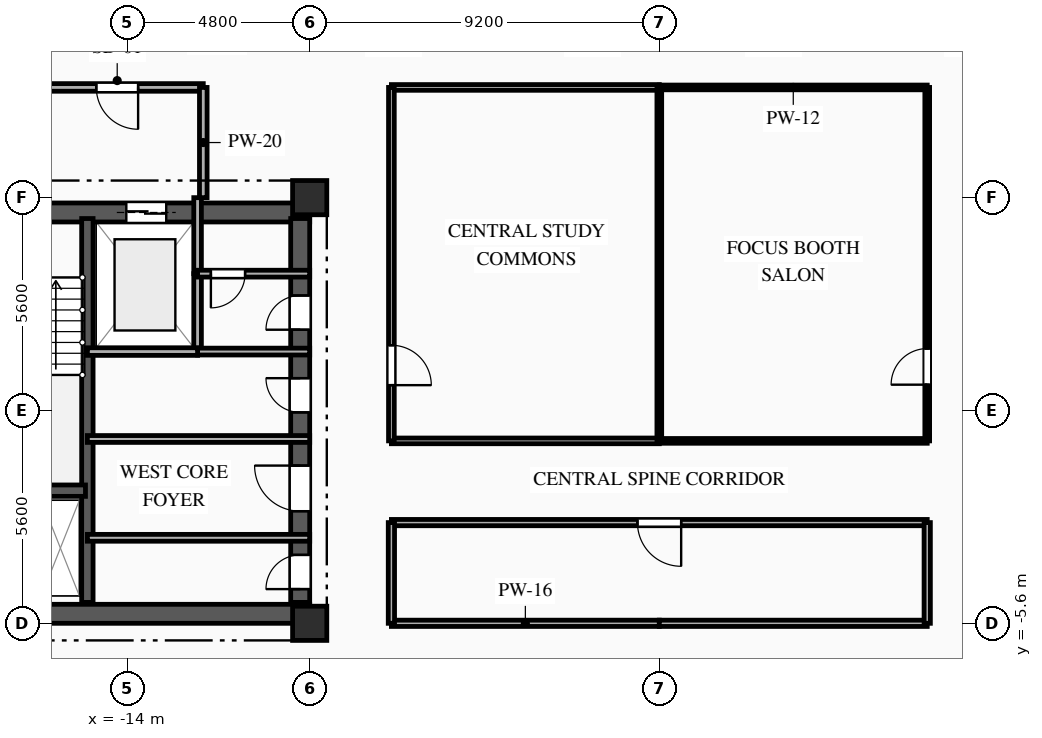
"""IFC4 building model, lengths in metres.
Left out: names, types, materials, properties, quantities, classifications, styles, units other than length and angle.
Written with IfcOpenShell. Run it as: python <this file> out.ifc"""

import sys

from ifc_helpers import new_model, si_unit, direction, frame, frame_2d, origin, origin_2d, place, context, subcontext, project, spatial, rectangle, extrude, element, fill, save


model = new_model("IFC4")
c1 = context("Model", 3, precision=1e-05, world=origin(), true_north=direction((0.0, 1.0)))
c2 = subcontext(c1, "Body", "Model", "MODEL_VIEW")
j1 = project(units=[si_unit("LENGTHUNIT", "METRE"), si_unit("PLANEANGLEUNIT", "RADIAN")], contexts=[c1])
p1 = place(None, origin())
s1 = spatial("IfcSite", under=j1, at=p1, CompositionType="ELEMENT")
p2 = place(p1, origin())
s2 = spatial("IfcBuilding", under=s1, at=p2, CompositionType="ELEMENT")
p3 = place(p2, frame((0.0, 0.0, 144.4)))
s3 = spatial("IfcBuildingStorey", under=s2, at=p3, CompositionType="ELEMENT", Elevation=144.4)
for number, where, z_axis, x_axis in (
    (1, (-9.2, -5.6, 0.0), (0.0, 0.0, 1.0), (1.0, 0.0, 0.0)),
    (2, (-9.2, 5.6, 0.0), (0.0, 0.0, 1.0), (1.0, 0.0, 0.0)),
):
    element("IfcColumn", number, at=place(p3, frame(where, z_axis=z_axis, x_axis=x_axis)), inside=s3, PredefinedType="COLUMN", context=c2, shape_type="SweptSolid", body=[
        extrude(rectangle(XDim=0.9, YDim=0.9, at=origin_2d()), origin(), (0.0, 0.0, 1.0), 3.35),
    ])
p4 = place(p3, frame((-18.8, 5.21, 0.0), z_axis=(0.0, 0.0, 1.0), x_axis=(1.0, 0.0, 0.0)))
e3 = element("IfcWall", 3, at=p4, inside=s3, PredefinedType="SHEAR", context=c2, shape_type="SweptSolid", body=[
    extrude(rectangle(XDim=9.6, YDim=0.5, at=frame_2d((4.8, 0.0))), origin(), (0.0, 0.0, 1.0), 3.04),
])
p5 = place(p4, frame((1.55, 0.0, 0.0)))
e4 = element("IfcOpeningElement", 4, at=p5, cuts=e3, PredefinedType="OPENING", context=c2, shape_type="SweptSolid", body=[
    extrude(rectangle(XDim=1.1, YDim=2.15, at=frame_2d((0.55, 1.075))), frame((0.0, 0.26, 0.0), z_axis=(0.0, -1.0, 0.0), x_axis=(1.0, 0.0, 0.0)), (0.0, 0.0, 1.0), 0.52),
])
p6 = place(p4, frame((4.775, 0.0, 0.0)))
e5 = element("IfcOpeningElement", 5, at=p6, cuts=e3, PredefinedType="OPENING", context=c2, shape_type="SweptSolid", body=[
    extrude(rectangle(XDim=1.05, YDim=2.1, at=frame_2d((0.525, 1.05))), frame((0.0, 0.26, 0.0), z_axis=(0.0, -1.0, 0.0), x_axis=(1.0, 0.0, 0.0)), (0.0, 0.0, 1.0), 0.52),
])
p7 = place(p3, frame((-18.8, -5.35, 0.0), z_axis=(0.0, 0.0, 1.0), x_axis=(1.0, 0.0, 0.0)))
e6 = element("IfcWall", 6, at=p7, inside=s3, PredefinedType="SHEAR", context=c2, shape_type="SweptSolid", body=[
    extrude(rectangle(XDim=9.6, YDim=0.5, at=frame_2d((4.8, 0.0))), origin(), (0.0, 0.0, 1.0), 3.04),
])
p8 = place(p7, frame((1.05, 0.0, 0.0)))
e7 = element("IfcOpeningElement", 7, at=p8, cuts=e6, PredefinedType="OPENING", context=c2, shape_type="SweptSolid", body=[
    extrude(rectangle(XDim=0.9, YDim=2.1, at=frame_2d((0.45, 1.05))), frame((0.0, 0.26, 0.0), z_axis=(0.0, -1.0, 0.0), x_axis=(1.0, 0.0, 0.0)), (0.0, 0.0, 1.0), 0.52),
])
p9 = place(p3, frame((-9.45, -5.05, 0.0), z_axis=(0.0, 0.0, 1.0), x_axis=(0.0, 1.0, 0.0)))
e8 = element("IfcWall", 8, at=p9, inside=s3, PredefinedType="SHEAR", context=c2, shape_type="SweptSolid", body=[
    extrude(rectangle(XDim=10.1, YDim=0.5, at=frame_2d((5.05, 0.0))), origin(), (0.0, 0.0, 1.0), 3.04),
])
p10 = place(p9, frame((7.175, 0.0, 0.0)))
e9 = element("IfcOpeningElement", 9, at=p10, cuts=e8, PredefinedType="OPENING", context=c2, shape_type="SweptSolid", body=[
    extrude(rectangle(XDim=0.9, YDim=2.1, at=frame_2d((0.45, 1.05))), frame((0.0, 0.26, 0.0), z_axis=(0.0, -1.0, 0.0), x_axis=(1.0, 0.0, 0.0)), (0.0, 0.0, 1.0), 0.52),
])
p11 = place(p9, frame((2.4, 0.0, 0.0)))
e10 = element("IfcOpeningElement", 10, at=p11, cuts=e8, PredefinedType="OPENING", context=c2, shape_type="SweptSolid", body=[
    extrude(rectangle(XDim=1.2, YDim=2.15, at=frame_2d((0.6, 1.075))), frame((0.0, 0.26, 0.0), z_axis=(0.0, -1.0, 0.0), x_axis=(1.0, 0.0, 0.0)), (0.0, 0.0, 1.0), 0.52),
])
p12 = place(p9, frame((0.35, 0.0, 0.0)))
e11 = element("IfcOpeningElement", 11, at=p12, cuts=e8, PredefinedType="OPENING", context=c2, shape_type="SweptSolid", body=[
    extrude(rectangle(XDim=0.9, YDim=2.1, at=frame_2d((0.45, 1.05))), frame((0.0, 0.26, 0.0), z_axis=(0.0, -1.0, 0.0), x_axis=(1.0, 0.0, 0.0)), (0.0, 0.0, 1.0), 0.52),
])
p13 = place(p9, frame((5.0, 0.0, 0.0)))
e12 = element("IfcOpeningElement", 12, at=p13, cuts=e8, PredefinedType="OPENING", context=c2, shape_type="SweptSolid", body=[
    extrude(rectangle(XDim=0.9, YDim=2.1, at=frame_2d((0.45, 1.05))), frame((0.0, 0.26, 0.0), z_axis=(0.0, -1.0, 0.0), x_axis=(1.0, 0.0, 0.0)), (0.0, 0.0, 1.0), 0.52),
])
p14 = place(p3, frame((-15.05, -5.05, 0.0), z_axis=(0.0, 0.0, 1.0), x_axis=(0.0, 1.0, 0.0)))
e13 = element("IfcWall", 13, at=p14, inside=s3, PredefinedType="SHEAR", context=c2, shape_type="SweptSolid", body=[
    extrude(rectangle(XDim=10.1, YDim=0.3, at=frame_2d((5.05, 0.0))), origin(), (0.0, 0.0, 1.0), 3.04),
])
p15 = place(p3, frame((-18.28, -2.11, 0.0), z_axis=(0.0, 0.0, 1.0), x_axis=(1.0, 0.0, 0.0)))
e14 = element("IfcWall", 14, at=p15, inside=s3, PredefinedType="SHEAR", context=c2, shape_type="SweptSolid", body=[
    extrude(rectangle(XDim=3.18, YDim=0.3, at=frame_2d((1.59, 0.0))), origin(), (0.0, 0.0, 1.0), 3.04),
])
p16 = place(p3, frame((-12.15, 1.55, 0.0), z_axis=(0.0, 0.0, 1.0), x_axis=(0.0, 1.0, 0.0)))
e15 = element("IfcWall", 15, at=p16, inside=s3, PredefinedType="PARTITIONING", context=c2, shape_type="SweptSolid", body=[
    extrude(rectangle(XDim=2.05, YDim=0.2, at=frame_2d((1.025, 0.0))), origin(), (0.0, 0.0, 1.0), 3.04),
])
p17 = place(p3, frame((-12.15, 3.6, 0.0), z_axis=(0.0, 0.0, 1.0), x_axis=(0.0, 1.0, 0.0)))
e16 = element("IfcWall", 16, at=p17, inside=s3, PredefinedType="PARTITIONING", context=c2, shape_type="SweptSolid", body=[
    extrude(rectangle(XDim=2.0, YDim=0.2, at=frame_2d((1.0, 0.0))), origin(), (0.0, 0.0, 1.0), 3.04),
])
p18 = place(p3, frame((-12.0, 8.5, 0.0), z_axis=(0.0, 0.0, 1.0), x_axis=(-1.0, 0.0, 0.0)))
e17 = element("IfcWall", 17, at=p18, inside=s3, PredefinedType="PARTITIONING", context=c2, shape_type="SweptSolid", body=[
    extrude(rectangle(XDim=6.8, YDim=0.2, at=frame_2d((3.4, 0.0))), origin(), (0.0, 0.0, 1.0), 3.04),
])
p19 = place(p18, frame((1.715, 0.0, 0.0)))
e18 = element("IfcOpeningElement", 18, at=p19, cuts=e17, PredefinedType="OPENING", context=c2, shape_type="SweptSolid", body=[
    extrude(rectangle(XDim=1.1, YDim=2.15, at=frame_2d((0.55, 1.075))), frame((0.0, 0.11, 0.0), z_axis=(0.0, -1.0, 0.0), x_axis=(1.0, 0.0, 0.0)), (0.0, 0.0, 1.0), 0.22),
])
p20 = place(p3, frame((-12.0, 5.6, 0.0), z_axis=(0.0, 0.0, 1.0), x_axis=(0.0, 1.0, 0.0)))
e19 = element("IfcWall", 19, at=p20, inside=s3, PredefinedType="PARTITIONING", context=c2, shape_type="SweptSolid", body=[
    extrude(rectangle(XDim=2.9, YDim=0.2, at=frame_2d((1.45, 0.0))), origin(), (0.0, 0.0, 1.0), 3.04),
])
p21 = place(p3, frame((-9.2, 3.6, 0.0), z_axis=(0.0, 0.0, 1.0), x_axis=(-1.0, 0.0, 0.0)))
e20 = element("IfcWall", 20, at=p21, inside=s3, PredefinedType="PARTITIONING", context=c2, shape_type="SweptSolid", body=[
    extrude(rectangle(XDim=2.95, YDim=0.18, at=frame_2d((1.475, 0.0))), origin(), (0.0, 0.0, 1.0), 3.04),
])
p22 = place(p21, frame((1.7, 0.0, 0.0)))
e21 = element("IfcOpeningElement", 21, at=p22, cuts=e20, PredefinedType="OPENING", context=c2, shape_type="SweptSolid", body=[
    extrude(rectangle(XDim=0.9, YDim=2.1, at=frame_2d((0.45, 1.05))), frame((0.0, 0.1, 0.0), z_axis=(0.0, -1.0, 0.0), x_axis=(1.0, 0.0, 0.0)), (0.0, 0.0, 1.0), 0.2),
])
p23 = place(p3, frame((-12.15, 1.55, 0.0), z_axis=(0.0, 0.0, 1.0), x_axis=(1.0, 0.0, 0.0)))
e22 = element("IfcWall", 22, at=p23, inside=s3, PredefinedType="PARTITIONING", context=c2, shape_type="SweptSolid", body=[
    extrude(rectangle(XDim=2.95, YDim=0.18, at=frame_2d((1.475, 0.0))), origin(), (0.0, 0.0, 1.0), 3.04),
])
p24 = place(p3, frame((-15.05, -3.35, 0.0), z_axis=(0.0, 0.0, 1.0), x_axis=(1.0, 0.0, 0.0)))
e23 = element("IfcWall", 23, at=p24, inside=s3, PredefinedType="PARTITIONING", context=c2, shape_type="SweptSolid", body=[
    extrude(rectangle(XDim=5.85, YDim=0.18, at=frame_2d((2.925, 0.0))), origin(), (0.0, 0.0, 1.0), 2.755),
])
p25 = place(p3, frame((-9.2, -0.75, 0.0), z_axis=(0.0, 0.0, 1.0), x_axis=(-1.0, 0.0, 0.0)))
e24 = element("IfcWall", 24, at=p25, inside=s3, PredefinedType="PARTITIONING", context=c2, shape_type="SweptSolid", body=[
    extrude(rectangle(XDim=5.85, YDim=0.18, at=frame_2d((2.925, 0.0))), origin(), (0.0, 0.0, 1.0), 3.04),
])
p26 = place(p3, frame((0.0, 8.5, 0.0), z_axis=(0.0, 0.0, 1.0), x_axis=(-1.0, 0.0, 0.0)))
e25 = element("IfcWall", 25, at=p26, inside=s3, PredefinedType="PARTITIONING", context=c2, shape_type="SweptSolid", body=[
    extrude(rectangle(XDim=7.05, YDim=0.15, at=frame_2d((3.525, 0.0))), origin(), (0.0, 0.0, 1.0), 3.04),
])
p27 = place(p3, frame((7.05, 8.5, 0.0), z_axis=(0.0, 0.0, 1.0), x_axis=(-1.0, 0.0, 0.0)))
e26 = element("IfcWall", 26, at=p27, inside=s3, PredefinedType="PARTITIONING", context=c2, shape_type="SweptSolid", body=[
    extrude(rectangle(XDim=7.05, YDim=0.125, at=frame_2d((3.525, 0.0))), origin(), (0.0, 0.0, 1.0), 3.04),
])
for number, where, z_axis, x_axis in (
    (27, (-7.05, -5.6, 0.0), (0.0, 0.0, 1.0), (1.0, 0.0, 0.0)),
    (28, (0.0, -5.6, 0.0), (0.0, 0.0, 1.0), (1.0, 0.0, 0.0)),
):
    element("IfcWall", number, at=place(p3, frame(where, z_axis=z_axis, x_axis=x_axis)), inside=s3, PredefinedType="PARTITIONING", context=c2, shape_type="SweptSolid", body=[
        extrude(rectangle(XDim=7.05, YDim=0.165, at=frame_2d((3.525, 0.0))), origin(), (0.0, 0.0, 1.0), 2.525),
    ])
p28 = place(p3, frame((-7.05, -0.8, 0.0), z_axis=(0.0, 0.0, 1.0), x_axis=(1.0, 0.0, 0.0)))
e29 = element("IfcWall", 29, at=p28, inside=s3, PredefinedType="PARTITIONING", context=c2, shape_type="SweptSolid", body=[
    extrude(rectangle(XDim=7.05, YDim=0.15, at=frame_2d((3.525, 0.0))), origin(), (0.0, 0.0, 1.0), 3.04),
])
p29 = place(p3, frame((0.0, -0.8, 0.0), z_axis=(0.0, 0.0, 1.0), x_axis=(1.0, 0.0, 0.0)))
e30 = element("IfcWall", 30, at=p29, inside=s3, PredefinedType="PARTITIONING", context=c2, shape_type="SweptSolid", body=[
    extrude(rectangle(XDim=7.05, YDim=0.125, at=frame_2d((3.525, 0.0))), origin(), (0.0, 0.0, 1.0), 3.04),
])
p30 = place(p3, frame((7.05, -2.95, 0.0), z_axis=(0.0, 0.0, 1.0), x_axis=(-1.0, 0.0, 0.0)))
e31 = element("IfcWall", 31, at=p30, inside=s3, PredefinedType="PARTITIONING", context=c2, shape_type="SweptSolid", body=[
    extrude(rectangle(XDim=14.1, YDim=0.165, at=frame_2d((7.05, 0.0))), origin(), (0.0, 0.0, 1.0), 3.04),
])
p31 = place(p30, frame((6.475, 0.0, 0.0)))
e32 = element("IfcOpeningElement", 32, at=p31, cuts=e31, PredefinedType="OPENING", context=c2, shape_type="SweptSolid", body=[
    extrude(rectangle(XDim=1.15, YDim=2.15, at=frame_2d((0.575, 1.075))), frame((0.0, 0.093, 0.0), z_axis=(0.0, -1.0, 0.0), x_axis=(1.0, 0.0, 0.0)), (0.0, 0.0, 1.0), 0.185),
])
p32 = place(p3, frame((-7.05, 8.5, 0.0), z_axis=(0.0, 0.0, 1.0), x_axis=(0.0, -1.0, 0.0)))
e33 = element("IfcWall", 33, at=p32, inside=s3, PredefinedType="PARTITIONING", context=c2, shape_type="SweptSolid", body=[
    extrude(rectangle(XDim=9.3, YDim=0.15, at=frame_2d((4.65, 0.0))), origin(), (0.0, 0.0, 1.0), 3.04),
])
p33 = place(p32, frame((6.784, 0.0, 0.0)))
e34 = element("IfcOpeningElement", 34, at=p33, cuts=e33, PredefinedType="OPENING", context=c2, shape_type="SweptSolid", body=[
    extrude(rectangle(XDim=1.05, YDim=2.15, at=frame_2d((0.525, 1.075))), frame((0.0, 0.085, 0.0), z_axis=(0.0, -1.0, 0.0), x_axis=(1.0, 0.0, 0.0)), (0.0, 0.0, 1.0), 0.17),
])
p34 = place(p3, frame((-7.05, -2.95, 0.0), z_axis=(0.0, 0.0, 1.0), x_axis=(0.0, -1.0, 0.0)))
e35 = element("IfcWall", 35, at=p34, inside=s3, PredefinedType="PARTITIONING", context=c2, shape_type="SweptSolid", body=[
    extrude(rectangle(XDim=2.65, YDim=0.165, at=frame_2d((1.325, 0.0))), origin(), (0.0, 0.0, 1.0), 3.04),
])
p35 = place(p3, frame((7.05, -0.8, 0.0), z_axis=(0.0, 0.0, 1.0), x_axis=(0.0, 1.0, 0.0)))
e36 = element("IfcWall", 36, at=p35, inside=s3, PredefinedType="PARTITIONING", context=c2, shape_type="SweptSolid", body=[
    extrude(rectangle(XDim=9.3, YDim=0.125, at=frame_2d((4.65, 0.0))), origin(), (0.0, 0.0, 1.0), 3.04),
])
p36 = place(p35, frame((1.479, 0.0, 0.0)))
e37 = element("IfcOpeningElement", 37, at=p36, cuts=e36, PredefinedType="OPENING", context=c2, shape_type="SweptSolid", body=[
    extrude(rectangle(XDim=0.95, YDim=2.1, at=frame_2d((0.475, 1.05))), frame((0.0, 0.073, 0.0), z_axis=(0.0, -1.0, 0.0), x_axis=(1.0, 0.0, 0.0)), (0.0, 0.0, 1.0), 0.145),
])
p37 = place(p3, frame((7.05, -5.6, 0.0), z_axis=(0.0, 0.0, 1.0), x_axis=(0.0, 1.0, 0.0)))
e38 = element("IfcWall", 38, at=p37, inside=s3, PredefinedType="PARTITIONING", context=c2, shape_type="SweptSolid", body=[
    extrude(rectangle(XDim=2.65, YDim=0.165, at=frame_2d((1.325, 0.0))), origin(), (0.0, 0.0, 1.0), 3.04),
])
p38 = place(p3, frame((0.0, 8.5, 0.0), z_axis=(0.0, 0.0, 1.0), x_axis=(0.0, -1.0, 0.0)))
e39 = element("IfcWall", 39, at=p38, inside=s3, PredefinedType="PARTITIONING", context=c2, shape_type="SweptSolid", body=[
    extrude(rectangle(XDim=9.3, YDim=0.125, at=frame_2d((4.65, 0.0))), origin(), (0.0, 0.0, 1.0), 3.04),
])
p39 = place(p3, frame((-15.05, 1.55, 0.0), z_axis=(0.0, 0.0, 1.0), x_axis=(1.0, 0.0, 0.0)))
e40 = element("IfcWall", 40, at=p39, inside=s3, PredefinedType="PARTITIONING", context=c2, shape_type="SweptSolid", body=[
    extrude(rectangle(XDim=2.9, YDim=0.2, at=frame_2d((1.45, 0.0))), origin(), (0.0, 0.0, 1.0), 3.04),
])
p40 = place(p6, origin())
e41 = element("IfcDoor", 41, at=p40, inside=s3, OperationType="DOUBLE_DOOR_SLIDING", PredefinedType="DOOR", context=c2, shape_type="SweptSolid", body=[
    extrude(rectangle(XDim=1.05, YDim=2.1, at=frame_2d((0.525, 1.05))), frame((0.0, 0.025, 0.0), z_axis=(0.0, -1.0, 0.0), x_axis=(1.0, 0.0, 0.0)), (0.0, 0.0, 1.0), 0.05),
])
fill(e5, e41)
p41 = place(p19, origin())
e42 = element("IfcDoor", 42, at=p41, inside=s3, OperationType="SINGLE_SWING_LEFT", PredefinedType="DOOR", context=c2, shape_type="SweptSolid", body=[
    extrude(rectangle(XDim=1.1, YDim=2.15, at=frame_2d((0.55, 1.075))), frame((0.0, 0.025, 0.0), z_axis=(0.0, -1.0, 0.0), x_axis=(1.0, 0.0, 0.0)), (0.0, 0.0, 1.0), 0.05),
])
fill(e18, e42)
p42 = place(p22, origin())
e43 = element("IfcDoor", 43, at=p42, inside=s3, OperationType="SINGLE_SWING_RIGHT", PredefinedType="DOOR", context=c2, shape_type="SweptSolid", body=[
    extrude(rectangle(XDim=0.9, YDim=2.1, at=frame_2d((0.45, 1.05))), frame((0.0, 0.025, 0.0), z_axis=(0.0, -1.0, 0.0), x_axis=(1.0, 0.0, 0.0)), (0.0, 0.0, 1.0), 0.05),
])
fill(e21, e43)
p43 = place(p10, origin())
e44 = element("IfcDoor", 44, at=p43, inside=s3, OperationType="SINGLE_SWING_LEFT", PredefinedType="DOOR", context=c2, shape_type="SweptSolid", body=[
    extrude(rectangle(XDim=0.9, YDim=2.1, at=frame_2d((0.45, 1.05))), frame((0.0, 0.025, 0.0), z_axis=(0.0, -1.0, 0.0), x_axis=(1.0, 0.0, 0.0)), (0.0, 0.0, 1.0), 0.05),
])
fill(e9, e44)
p44 = place(p11, origin())
e45 = element("IfcDoor", 45, at=p44, inside=s3, OperationType="SINGLE_SWING_RIGHT", PredefinedType="DOOR", context=c2, shape_type="SweptSolid", body=[
    extrude(rectangle(XDim=1.2, YDim=2.15, at=frame_2d((0.6, 1.075))), frame((0.0, 0.025, 0.0), z_axis=(0.0, -1.0, 0.0), x_axis=(1.0, 0.0, 0.0)), (0.0, 0.0, 1.0), 0.05),
])
fill(e10, e45)
p45 = place(p12, origin())
e46 = element("IfcDoor", 46, at=p45, inside=s3, OperationType="SINGLE_SWING_LEFT", PredefinedType="DOOR", context=c2, shape_type="SweptSolid", body=[
    extrude(rectangle(XDim=0.9, YDim=2.1, at=frame_2d((0.45, 1.05))), frame((0.0, 0.025, 0.0), z_axis=(0.0, -1.0, 0.0), x_axis=(1.0, 0.0, 0.0)), (0.0, 0.0, 1.0), 0.05),
])
fill(e11, e46)
p46 = place(p13, origin())
e47 = element("IfcDoor", 47, at=p46, inside=s3, OperationType="SINGLE_SWING_RIGHT", PredefinedType="DOOR", context=c2, shape_type="SweptSolid", body=[
    extrude(rectangle(XDim=0.9, YDim=2.1, at=frame_2d((0.45, 1.05))), frame((0.0, 0.025, 0.0), z_axis=(0.0, -1.0, 0.0), x_axis=(1.0, 0.0, 0.0)), (0.0, 0.0, 1.0), 0.05),
])
fill(e12, e47)
p47 = place(p31, origin())
e48 = element("IfcDoor", 48, at=p47, inside=s3, OperationType="SINGLE_SWING_LEFT", PredefinedType="DOOR", context=c2, shape_type="SweptSolid", body=[
    extrude(rectangle(XDim=1.15, YDim=2.15, at=frame_2d((0.575, 1.075))), frame((0.0, 0.025, 0.0), z_axis=(0.0, -1.0, 0.0), x_axis=(1.0, 0.0, 0.0)), (0.0, 0.0, 1.0), 0.05),
])
fill(e32, e48)
p48 = place(p33, origin())
e49 = element("IfcDoor", 49, at=p48, inside=s3, OperationType="SINGLE_SWING_RIGHT", PredefinedType="DOOR", context=c2, shape_type="SweptSolid", body=[
    extrude(rectangle(XDim=1.05, YDim=2.15, at=frame_2d((0.525, 1.075))), frame((0.0, 0.025, 0.0), z_axis=(0.0, -1.0, 0.0), x_axis=(1.0, 0.0, 0.0)), (0.0, 0.0, 1.0), 0.05),
])
fill(e34, e49)
p49 = place(p36, origin())
e50 = element("IfcDoor", 50, at=p49, inside=s3, OperationType="SINGLE_SWING_LEFT", PredefinedType="DOOR", context=c2, shape_type="SweptSolid", body=[
    extrude(rectangle(XDim=0.95, YDim=2.1, at=frame_2d((0.475, 1.05))), frame((0.0, 0.025, 0.0), z_axis=(0.0, -1.0, 0.0), x_axis=(1.0, 0.0, 0.0)), (0.0, 0.0, 1.0), 0.05),
])
fill(e37, e50)
save(model, sys.argv[1])
